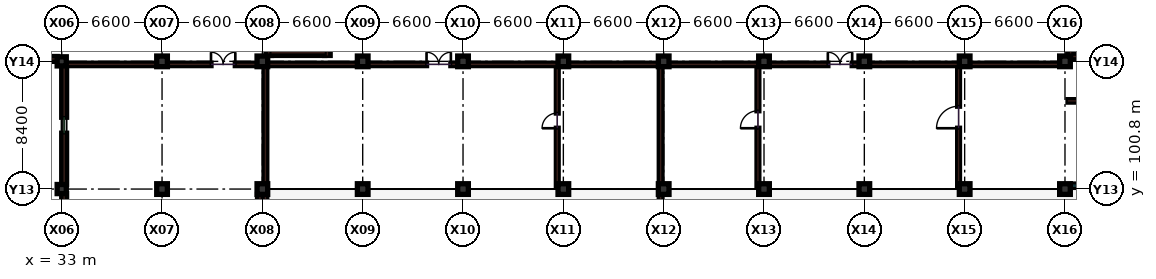
"""IFC4 building model, lengths in metres.
Left out: names, types, materials, properties, quantities, classifications, styles, units other than length and angle.
Written with IfcOpenShell. Run it as: python <this file> out.ifc"""

import sys

from ifc_helpers import new_model, si_unit, direction, frame, frame_2d, origin, origin_2d, place, context, subcontext, project, spatial, rectangle, extrude, element, fill, save


model = new_model("IFC4")
c1 = context("Model", 3, precision=1e-05, world=origin(), true_north=direction((0.0, 1.0)))
c2 = subcontext(c1, "Body", "Model", "MODEL_VIEW")
j1 = project(units=[si_unit("LENGTHUNIT", "METRE"), si_unit("PLANEANGLEUNIT", "RADIAN")], contexts=[c1])
p1 = place(None, origin())
s1 = spatial("IfcSite", under=j1, at=p1, CompositionType="ELEMENT")
p2 = place(p1, origin())
s2 = spatial("IfcBuilding", under=s1, at=p2, CompositionType="ELEMENT")
p3 = place(p2, origin())
s3 = spatial("IfcBuildingStorey", under=s2, at=p3, CompositionType="ELEMENT", Elevation=0.0)
for number, where, z_axis, x_axis in (
    (1, (33.0, 100.8, 0.0), (0.0, 0.0, 1.0), (1.0, 0.0, 0.0)),
    (2, (33.0, 109.2, 0.0), (0.0, 0.0, 1.0), (1.0, 0.0, 0.0)),
):
    element("IfcColumn", number, at=place(p3, frame(where, z_axis=z_axis, x_axis=x_axis)), inside=s3, PredefinedType="COLUMN", context=c2, shape_type="SweptSolid", body=[
        extrude(rectangle(XDim=0.6, YDim=0.6, at=origin_2d()), origin(), (0.0, 0.0, 1.0), 5.4),
    ])
for number, where, z_axis, x_axis in (
    (3, (39.6, 100.8, 0.0), (0.0, 0.0, 1.0), (1.0, 0.0, 0.0)),
    (4, (39.6, 109.2, 0.0), (0.0, 0.0, 1.0), (1.0, 0.0, 0.0)),
    (5, (46.2, 100.8, 0.0), (0.0, 0.0, 1.0), (1.0, 0.0, 0.0)),
    (6, (46.2, 109.2, 0.0), (0.0, 0.0, 1.0), (1.0, 0.0, 0.0)),
    (7, (52.8, 100.8, 0.0), (0.0, 0.0, 1.0), (1.0, 0.0, 0.0)),
    (8, (52.8, 109.2, 0.0), (0.0, 0.0, 1.0), (1.0, 0.0, 0.0)),
    (9, (59.4, 100.8, 0.0), (0.0, 0.0, 1.0), (1.0, 0.0, 0.0)),
    (10, (59.4, 109.2, 0.0), (0.0, 0.0, 1.0), (1.0, 0.0, 0.0)),
    (11, (66.0, 100.8, 0.0), (0.0, 0.0, 1.0), (1.0, 0.0, 0.0)),
    (12, (66.0, 109.2, 0.0), (0.0, 0.0, 1.0), (1.0, 0.0, 0.0)),
    (13, (72.6, 100.8, 0.0), (0.0, 0.0, 1.0), (1.0, 0.0, 0.0)),
    (14, (72.6, 109.2, 0.0), (0.0, 0.0, 1.0), (1.0, 0.0, 0.0)),
    (15, (79.2, 100.8, 0.0), (0.0, 0.0, 1.0), (1.0, 0.0, 0.0)),
    (16, (79.2, 109.2, 0.0), (0.0, 0.0, 1.0), (1.0, 0.0, 0.0)),
    (17, (85.8, 100.8, 0.0), (0.0, 0.0, 1.0), (1.0, 0.0, 0.0)),
    (18, (85.8, 109.2, 0.0), (0.0, 0.0, 1.0), (1.0, 0.0, 0.0)),
    (19, (92.4, 100.8, 0.0), (0.0, 0.0, 1.0), (1.0, 0.0, 0.0)),
    (20, (92.4, 109.2, 0.0), (0.0, 0.0, 1.0), (1.0, 0.0, 0.0)),
    (21, (99.0, 100.8, 0.0), (0.0, 0.0, 1.0), (1.0, 0.0, 0.0)),
    (22, (99.0, 109.2, 0.0), (0.0, 0.0, 1.0), (1.0, 0.0, 0.0)),
):
    element("IfcColumn", number, at=place(p3, frame(where, z_axis=z_axis, x_axis=x_axis)), inside=s3, PredefinedType="COLUMN", context=c2, shape_type="SweptSolid", body=[
        extrude(rectangle(XDim=0.7, YDim=0.7, at=origin_2d()), origin(), (0.0, 0.0, 1.0), 5.4),
    ])
p4 = place(p3, frame((33.32, 109.0, 0.0), z_axis=(0.0, 0.0, 1.0), x_axis=(1.0, 0.0, 0.0)))
e23 = element("IfcWall", 23, at=p4, inside=s3, PredefinedType="PARTITIONING", context=c2, shape_type="SweptSolid", body=[
    extrude(rectangle(XDim=5.83, YDim=0.16, at=frame_2d((2.915, 0.0))), origin(), (0.0, 0.0, 1.0), 4.235),
])
p5 = place(p3, frame((40.05, 109.0, 0.0), z_axis=(0.0, 0.0, 1.0), x_axis=(1.0, 0.0, 0.0)))
e24 = element("IfcWall", 24, at=p5, inside=s3, PredefinedType="PARTITIONING", context=c2, shape_type="SweptSolid", body=[
    extrude(rectangle(XDim=5.7, YDim=0.16, at=frame_2d((2.85, 0.0))), origin(), (0.0, 0.0, 1.0), 4.235),
])
p6 = place(p5, frame((2.77, 0.0, 0.0)))
e25 = element("IfcOpeningElement", 25, at=p6, cuts=e24, PredefinedType="OPENING", context=c2, shape_type="SweptSolid", body=[
    extrude(rectangle(XDim=1.6, YDim=2.2, at=frame_2d((0.8, 1.1))), frame((0.0, 0.09, 0.0), z_axis=(0.0, -1.0, 0.0), x_axis=(1.0, 0.0, 0.0)), (0.0, 0.0, 1.0), 0.18),
])
p7 = place(p3, frame((46.65, 109.0, 0.0), z_axis=(0.0, 0.0, 1.0), x_axis=(1.0, 0.0, 0.0)))
e26 = element("IfcWall", 26, at=p7, inside=s3, PredefinedType="PARTITIONING", context=c2, shape_type="SweptSolid", body=[
    extrude(rectangle(XDim=5.7, YDim=0.16, at=frame_2d((2.85, 0.0))), origin(), (0.0, 0.0, 1.0), 4.235),
])
p8 = place(p3, frame((53.25, 109.0, 0.0), z_axis=(0.0, 0.0, 1.0), x_axis=(1.0, 0.0, 0.0)))
e27 = element("IfcWall", 27, at=p8, inside=s3, PredefinedType="PARTITIONING", context=c2, shape_type="SweptSolid", body=[
    extrude(rectangle(XDim=5.7, YDim=0.16, at=frame_2d((2.85, 0.0))), origin(), (0.0, 0.0, 1.0), 4.235),
])
p9 = place(p8, frame((3.75, 0.0, 0.0)))
e28 = element("IfcOpeningElement", 28, at=p9, cuts=e27, PredefinedType="OPENING", context=c2, shape_type="SweptSolid", body=[
    extrude(rectangle(XDim=1.6, YDim=2.2, at=frame_2d((0.8, 1.1))), frame((0.0, 0.09, 0.0), z_axis=(0.0, -1.0, 0.0), x_axis=(1.0, 0.0, 0.0)), (0.0, 0.0, 1.0), 0.18),
])
for number, where, z_axis, x_axis in (
    (29, (59.85, 109.0, 0.0), (0.0, 0.0, 1.0), (1.0, 0.0, 0.0)),
    (30, (66.45, 109.0, 0.0), (0.0, 0.0, 1.0), (1.0, 0.0, 0.0)),
    (31, (73.05, 109.0, 0.0), (0.0, 0.0, 1.0), (1.0, 0.0, 0.0)),
):
    element("IfcWall", number, at=place(p3, frame(where, z_axis=z_axis, x_axis=x_axis)), inside=s3, PredefinedType="PARTITIONING", context=c2, shape_type="SweptSolid", body=[
        extrude(rectangle(XDim=5.7, YDim=0.16, at=frame_2d((2.85, 0.0))), origin(), (0.0, 0.0, 1.0), 4.235),
    ])
p10 = place(p3, frame((79.65, 109.0, 0.0), z_axis=(0.0, 0.0, 1.0), x_axis=(1.0, 0.0, 0.0)))
e32 = element("IfcWall", 32, at=p10, inside=s3, PredefinedType="PARTITIONING", context=c2, shape_type="SweptSolid", body=[
    extrude(rectangle(XDim=5.7, YDim=0.16, at=frame_2d((2.85, 0.0))), origin(), (0.0, 0.0, 1.0), 4.235),
])
p11 = place(p10, frame((3.75, 0.0, 0.0)))
e33 = element("IfcOpeningElement", 33, at=p11, cuts=e32, PredefinedType="OPENING", context=c2, shape_type="SweptSolid", body=[
    extrude(rectangle(XDim=1.6, YDim=2.2, at=frame_2d((0.8, 1.1))), frame((0.0, 0.09, 0.0), z_axis=(0.0, -1.0, 0.0), x_axis=(1.0, 0.0, 0.0)), (0.0, 0.0, 1.0), 0.18),
])
p12 = place(p3, frame((86.25, 109.0, 0.0), z_axis=(0.0, 0.0, 1.0), x_axis=(1.0, 0.0, 0.0)))
e34 = element("IfcWall", 34, at=p12, inside=s3, PredefinedType="PARTITIONING", context=c2, shape_type="SweptSolid", body=[
    extrude(rectangle(XDim=5.7, YDim=0.16, at=frame_2d((2.85, 0.0))), origin(), (0.0, 0.0, 1.0), 4.235),
])
p13 = place(p3, frame((92.85, 109.0, 0.0), z_axis=(0.0, 0.0, 1.0), x_axis=(1.0, 0.0, 0.0)))
e35 = element("IfcWall", 35, at=p13, inside=s3, PredefinedType="PARTITIONING", context=c2, shape_type="SweptSolid", body=[
    extrude(rectangle(XDim=6.45, YDim=0.16, at=frame_2d((3.225, 0.0))), origin(), (0.0, 0.0, 1.0), 4.235),
])
p14 = place(p3, frame((46.4, 92.7, 0.0), z_axis=(0.0, 0.0, 1.0), x_axis=(0.0, 1.0, 0.0)))
e36 = element("IfcWall", 36, at=p14, inside=s3, PredefinedType="SOLIDWALL", context=c2, shape_type="SweptSolid", body=[
    extrude(rectangle(XDim=7.65, YDim=0.18, at=frame_2d((3.825, 0.0))), origin(), (0.0, 0.0, 1.0), 4.25),
])
p15 = place(p3, frame((46.4, 101.25, 0.0), z_axis=(0.0, 0.0, 1.0), x_axis=(0.0, 1.0, 0.0)))
e37 = element("IfcWall", 37, at=p15, inside=s3, PredefinedType="SOLIDWALL", context=c2, shape_type="SweptSolid", body=[
    extrude(rectangle(XDim=7.75, YDim=0.18, at=frame_2d((3.875, 0.0))), origin(), (0.0, 0.0, 1.0), 4.25),
])
p16 = place(p3, frame((72.4, 92.7, 0.0), z_axis=(0.0, 0.0, 1.0), x_axis=(0.0, 1.0, 0.0)))
e38 = element("IfcWall", 38, at=p16, inside=s3, PredefinedType="SOLIDWALL", context=c2, shape_type="SweptSolid", body=[
    extrude(rectangle(XDim=7.65, YDim=0.18, at=frame_2d((3.825, 0.0))), origin(), (0.0, 0.0, 1.0), 4.25),
])
p17 = place(p3, frame((72.4, 101.25, 0.0), z_axis=(0.0, 0.0, 1.0), x_axis=(0.0, 1.0, 0.0)))
e39 = element("IfcWall", 39, at=p17, inside=s3, PredefinedType="SOLIDWALL", context=c2, shape_type="SweptSolid", body=[
    extrude(rectangle(XDim=7.75, YDim=0.18, at=frame_2d((3.875, 0.0))), origin(), (0.0, 0.0, 1.0), 4.25),
])
p18 = place(p3, frame((65.6, 101.0, 0.0), z_axis=(0.0, 0.0, 1.0), x_axis=(0.0, 1.0, 0.0)))
e40 = element("IfcWall", 40, at=p18, inside=s3, PredefinedType="PARTITIONING", context=c2, shape_type="SweptSolid", body=[
    extrude(rectangle(XDim=8.0, YDim=0.12, at=frame_2d((4.0, 0.0))), origin(), (0.0, 0.0, 1.0), 4.25),
])
p19 = place(p18, frame((3.8, 0.0, 0.0)))
e41 = element("IfcOpeningElement", 41, at=p19, cuts=e40, PredefinedType="OPENING", context=c2, shape_type="SweptSolid", body=[
    extrude(rectangle(XDim=1.0, YDim=2.2, at=frame_2d((0.5, 1.1))), frame((0.0, 0.07, 0.0), z_axis=(0.0, -1.0, 0.0), x_axis=(1.0, 0.0, 0.0)), (0.0, 0.0, 1.0), 0.14),
])
p20 = place(p3, frame((78.8, 101.0, 0.0), z_axis=(0.0, 0.0, 1.0), x_axis=(0.0, 1.0, 0.0)))
e42 = element("IfcWall", 42, at=p20, inside=s3, PredefinedType="PARTITIONING", context=c2, shape_type="SweptSolid", body=[
    extrude(rectangle(XDim=8.0, YDim=0.12, at=frame_2d((4.0, 0.0))), origin(), (0.0, 0.0, 1.0), 4.25),
])
p21 = place(p20, frame((3.8, 0.0, 0.0)))
e43 = element("IfcOpeningElement", 43, at=p21, cuts=e42, PredefinedType="OPENING", context=c2, shape_type="SweptSolid", body=[
    extrude(rectangle(XDim=1.15, YDim=2.2, at=frame_2d((0.575, 1.1))), frame((0.0, 0.07, 0.0), z_axis=(0.0, -1.0, 0.0), x_axis=(1.0, 0.0, 0.0)), (0.0, 0.0, 1.0), 0.14),
])
p22 = place(p3, frame((92.0, 101.0, 0.0), z_axis=(0.0, 0.0, 1.0), x_axis=(0.0, 1.0, 0.0)))
e44 = element("IfcWall", 44, at=p22, inside=s3, PredefinedType="PARTITIONING", context=c2, shape_type="SweptSolid", body=[
    extrude(rectangle(XDim=8.0, YDim=0.12, at=frame_2d((4.0, 0.0))), origin(), (0.0, 0.0, 1.0), 4.25),
])
p23 = place(p22, frame((3.8, 0.0, 0.0)))
e45 = element("IfcOpeningElement", 45, at=p23, cuts=e44, PredefinedType="OPENING", context=c2, shape_type="SweptSolid", body=[
    extrude(rectangle(XDim=1.45, YDim=2.25, at=frame_2d((0.725, 1.125))), frame((0.0, 0.07, 0.0), z_axis=(0.0, -1.0, 0.0), x_axis=(1.0, 0.0, 0.0)), (0.0, 0.0, 1.0), 0.14),
])
p24 = place(p3, frame((99.2, 106.6, 0.0), z_axis=(0.0, 0.0, 1.0), x_axis=(1.0, 0.0, 0.0)))
e46 = element("IfcWall", 46, at=p24, inside=s3, PredefinedType="PARTITIONING", context=c2, shape_type="SweptSolid", body=[
    extrude(rectangle(XDim=12.9, YDim=0.16, at=frame_2d((6.45, 0.0))), origin(), (0.0, 0.0, 1.0), 4.25),
])
p25 = place(p24, frame((4.2, 0.0, 0.0)))
e47 = element("IfcOpeningElement", 47, at=p25, cuts=e46, PredefinedType="OPENING", context=c2, shape_type="SweptSolid", body=[
    extrude(rectangle(XDim=1.05, YDim=2.15, at=frame_2d((0.525, 1.075))), frame((0.0, 0.09, 0.0), z_axis=(0.0, -1.0, 0.0), x_axis=(1.0, 0.0, 0.0)), (0.0, 0.0, 1.0), 0.18),
])
p26 = place(p3, frame((26.62, 109.36, 0.0), z_axis=(0.0, 0.0, 1.0), x_axis=(1.0, 0.0, 0.0)))
e48 = element("IfcWall", 48, at=p26, inside=s3, PredefinedType="SOLIDWALL", context=c2, shape_type="SweptSolid", body=[
    extrude(rectangle(XDim=6.085, YDim=0.32, at=frame_2d((3.042, 0.0))), origin(), (0.0, 0.0, 1.0), 4.385),
])
p27 = place(p26, frame((1.39, 0.0, 1.35)))
e49 = element("IfcOpeningElement", 49, at=p27, cuts=e48, PredefinedType="OPENING", context=c2, shape_type="SweptSolid", body=[
    extrude(rectangle(XDim=3.3, YDim=1.05, at=frame_2d((1.65, 0.525))), frame((0.0, 0.17, 0.0), z_axis=(0.0, -1.0, 0.0), x_axis=(1.0, 0.0, 0.0)), (0.0, 0.0, 1.0), 0.34),
])
p28 = place(p3, frame((33.16, 100.505, 0.0), z_axis=(0.0, 0.0, 1.0), x_axis=(0.0, -1.0, 0.0)))
e50 = element("IfcWall", 50, at=p28, inside=s3, PredefinedType="SOLIDWALL", context=c2, shape_type="SweptSolid", body=[
    extrude(rectangle(XDim=7.81, YDim=0.32, at=frame_2d((3.905, 0.0))), origin(), (0.0, 0.0, 1.0), 4.335),
])
p29 = place(p28, frame((3.155, 0.0, 0.95)))
e51 = element("IfcOpeningElement", 51, at=p29, cuts=e50, PredefinedType="OPENING", context=c2, shape_type="SweptSolid", body=[
    extrude(rectangle(XDim=1.5, YDim=2.1, at=frame_2d((0.75, 1.05))), frame((0.0, 0.17, 0.0), z_axis=(0.0, -1.0, 0.0), x_axis=(1.0, 0.0, 0.0)), (0.0, 0.0, 1.0), 0.34),
])
p30 = place(p3, frame((33.16, 108.905, 0.0), z_axis=(0.0, 0.0, 1.0), x_axis=(0.0, -1.0, 0.0)))
e52 = element("IfcWall", 52, at=p30, inside=s3, PredefinedType="SOLIDWALL", context=c2, shape_type="SweptSolid", body=[
    extrude(rectangle(XDim=7.81, YDim=0.32, at=frame_2d((3.905, 0.0))), origin(), (0.0, 0.0, 1.0), 4.335),
])
p31 = place(p30, frame((3.38, 0.0, 0.95)))
e53 = element("IfcOpeningElement", 53, at=p31, cuts=e52, PredefinedType="OPENING", context=c2, shape_type="SweptSolid", body=[
    extrude(rectangle(XDim=1.05, YDim=1.75, at=frame_2d((0.525, 0.875))), frame((0.0, 0.17, 0.0), z_axis=(0.0, -1.0, 0.0), x_axis=(1.0, 0.0, 0.0)), (0.0, 0.0, 1.0), 0.34),
])
p32 = place(p3, frame((46.04, 92.695, 0.0), z_axis=(0.0, 0.0, 1.0), x_axis=(0.0, 1.0, 0.0)))
e54 = element("IfcWall", 54, at=p32, inside=s3, PredefinedType="SOLIDWALL", context=c2, shape_type="SweptSolid", body=[
    extrude(rectangle(XDim=7.76, YDim=0.32, at=frame_2d((3.88, 0.0))), origin(), (0.0, 0.0, 1.0), 4.335),
])
p33 = place(p32, frame((3.13, 0.0, 0.95)))
e55 = element("IfcOpeningElement", 55, at=p33, cuts=e54, PredefinedType="OPENING", context=c2, shape_type="SweptSolid", body=[
    extrude(rectangle(XDim=1.5, YDim=2.1, at=frame_2d((0.75, 1.05))), frame((0.0, 0.17, 0.0), z_axis=(0.0, -1.0, 0.0), x_axis=(1.0, 0.0, 0.0)), (0.0, 0.0, 1.0), 0.34),
])
p34 = place(p3, frame((99.5, 101.02, 0.0), z_axis=(0.0, 0.0, 1.0), x_axis=(1.0, 0.0, 0.0)))
e56 = element("IfcWall", 56, at=p34, inside=s3, PredefinedType="SOLIDWALL", context=c2, shape_type="SweptSolid", body=[
    extrude(rectangle(XDim=5.6, YDim=0.22, at=frame_2d((2.8, 0.0))), origin(), (0.0, 0.0, 1.0), 0.85),
])
p35 = place(p3, frame((99.37, 109.34, 0.0), z_axis=(0.0, 0.0, 1.0), x_axis=(0.0, 1.0, 0.0)))
e57 = element("IfcWall", 57, at=p35, inside=s3, PredefinedType="SHEAR", context=c2, shape_type="SweptSolid", body=[
    extrude(rectangle(XDim=8.09, YDim=0.36, at=frame_2d((4.045, 0.0))), origin(), (0.0, 0.0, 1.0), 5.1),
])
p36 = place(p3, frame((99.55, 109.52, 0.0), z_axis=(0.0, 0.0, 1.0), x_axis=(1.0, 0.0, 0.0)))
e58 = element("IfcWall", 58, at=p36, inside=s3, PredefinedType="SHEAR", context=c2, shape_type="SweptSolid", body=[
    extrude(rectangle(XDim=3.8, YDim=0.36, at=frame_2d((1.9, 0.0))), origin(), (0.0, 0.0, 1.0), 5.1),
])
p37 = place(p3, frame((46.62, 109.59, 0.0), z_axis=(0.0, 0.0, 1.0), x_axis=(0.0, 1.0, 0.0)))
e59 = element("IfcWall", 59, at=p37, inside=s3, PredefinedType="SHEAR", context=c2, shape_type="SweptSolid", body=[
    extrude(rectangle(XDim=7.84, YDim=0.36, at=frame_2d((3.92, 0.0))), origin(), (0.0, 0.0, 1.0), 5.1),
])
p38 = place(p3, frame((50.48, 109.59, 0.0), z_axis=(0.0, 0.0, 1.0), x_axis=(0.0, 1.0, 0.0)))
e60 = element("IfcWall", 60, at=p38, inside=s3, PredefinedType="SHEAR", context=c2, shape_type="SweptSolid", body=[
    extrude(rectangle(XDim=7.84, YDim=0.36, at=frame_2d((3.92, 0.0))), origin(), (0.0, 0.0, 1.0), 5.1),
])
p39 = place(p38, frame((0.45, 0.0, 0.0)))
e61 = element("IfcOpeningElement", 61, at=p39, cuts=e60, PredefinedType="OPENING", context=c2, shape_type="SweptSolid", body=[
    extrude(rectangle(XDim=1.25, YDim=2.15, at=frame_2d((0.625, 1.075))), frame((0.0, 0.19, 0.0), z_axis=(0.0, -1.0, 0.0), x_axis=(1.0, 0.0, 0.0)), (0.0, 0.0, 1.0), 0.38),
])
p40 = place(p3, frame((46.8, 109.77, 0.0), z_axis=(0.0, 0.0, 1.0), x_axis=(1.0, 0.0, 0.0)))
e62 = element("IfcWall", 62, at=p40, inside=s3, PredefinedType="SHEAR", context=c2, shape_type="SweptSolid", body=[
    extrude(rectangle(XDim=3.5, YDim=0.36, at=frame_2d((1.75, 0.0))), origin(), (0.0, 0.0, 1.0), 5.1),
])
p41 = place(p6, origin())
e63 = element("IfcDoor", 63, at=p41, inside=s3, OperationType="DOUBLE_DOOR_SINGLE_SWING", PredefinedType="DOOR", context=c2, shape_type="SweptSolid", body=[
    extrude(rectangle(XDim=1.6, YDim=2.2, at=frame_2d((0.8, 1.1))), frame((0.0, 0.025, 0.0), z_axis=(0.0, -1.0, 0.0), x_axis=(1.0, 0.0, 0.0)), (0.0, 0.0, 1.0), 0.05),
])
fill(e25, e63)
p42 = place(p9, origin())
e64 = element("IfcDoor", 64, at=p42, inside=s3, OperationType="DOUBLE_DOOR_SINGLE_SWING", PredefinedType="DOOR", context=c2, shape_type="SweptSolid", body=[
    extrude(rectangle(XDim=1.6, YDim=2.2, at=frame_2d((0.8, 1.1))), frame((0.0, 0.025, 0.0), z_axis=(0.0, -1.0, 0.0), x_axis=(1.0, 0.0, 0.0)), (0.0, 0.0, 1.0), 0.05),
])
fill(e28, e64)
p43 = place(p11, origin())
e65 = element("IfcDoor", 65, at=p43, inside=s3, OperationType="DOUBLE_DOOR_SINGLE_SWING", PredefinedType="DOOR", context=c2, shape_type="SweptSolid", body=[
    extrude(rectangle(XDim=1.6, YDim=2.2, at=frame_2d((0.8, 1.1))), frame((0.0, 0.025, 0.0), z_axis=(0.0, -1.0, 0.0), x_axis=(1.0, 0.0, 0.0)), (0.0, 0.0, 1.0), 0.05),
])
fill(e33, e65)
p44 = place(p19, origin())
e66 = element("IfcDoor", 66, at=p44, inside=s3, OperationType="SINGLE_SWING_LEFT", PredefinedType="DOOR", context=c2, shape_type="SweptSolid", body=[
    extrude(rectangle(XDim=1.0, YDim=2.2, at=frame_2d((0.5, 1.1))), frame((0.0, 0.025, 0.0), z_axis=(0.0, -1.0, 0.0), x_axis=(1.0, 0.0, 0.0)), (0.0, 0.0, 1.0), 0.05),
])
fill(e41, e66)
p45 = place(p21, origin())
e67 = element("IfcDoor", 67, at=p45, inside=s3, OperationType="SINGLE_SWING_LEFT", PredefinedType="DOOR", context=c2, shape_type="SweptSolid", body=[
    extrude(rectangle(XDim=1.15, YDim=2.2, at=frame_2d((0.575, 1.1))), frame((0.0, 0.025, 0.0), z_axis=(0.0, -1.0, 0.0), x_axis=(1.0, 0.0, 0.0)), (0.0, 0.0, 1.0), 0.05),
])
fill(e43, e67)
p46 = place(p23, origin())
e68 = element("IfcDoor", 68, at=p46, inside=s3, OperationType="SINGLE_SWING_LEFT", PredefinedType="DOOR", context=c2, shape_type="SweptSolid", body=[
    extrude(rectangle(XDim=1.45, YDim=2.25, at=frame_2d((0.725, 1.125))), frame((0.0, 0.025, 0.0), z_axis=(0.0, -1.0, 0.0), x_axis=(1.0, 0.0, 0.0)), (0.0, 0.0, 1.0), 0.05),
])
fill(e45, e68)
p47 = place(p31, origin())
e69 = element("IfcWindow", 69, at=p47, inside=s3, PartitioningType="SINGLE_PANEL", PredefinedType="WINDOW", context=c2, shape_type="SweptSolid", body=[
    extrude(rectangle(XDim=1.05, YDim=1.75, at=frame_2d((0.525, 0.875))), frame((0.0, 0.03, 0.0), z_axis=(0.0, -1.0, 0.0), x_axis=(1.0, 0.0, 0.0)), (0.0, 0.0, 1.0), 0.06),
])
fill(e53, e69)
save(model, sys.argv[1])
